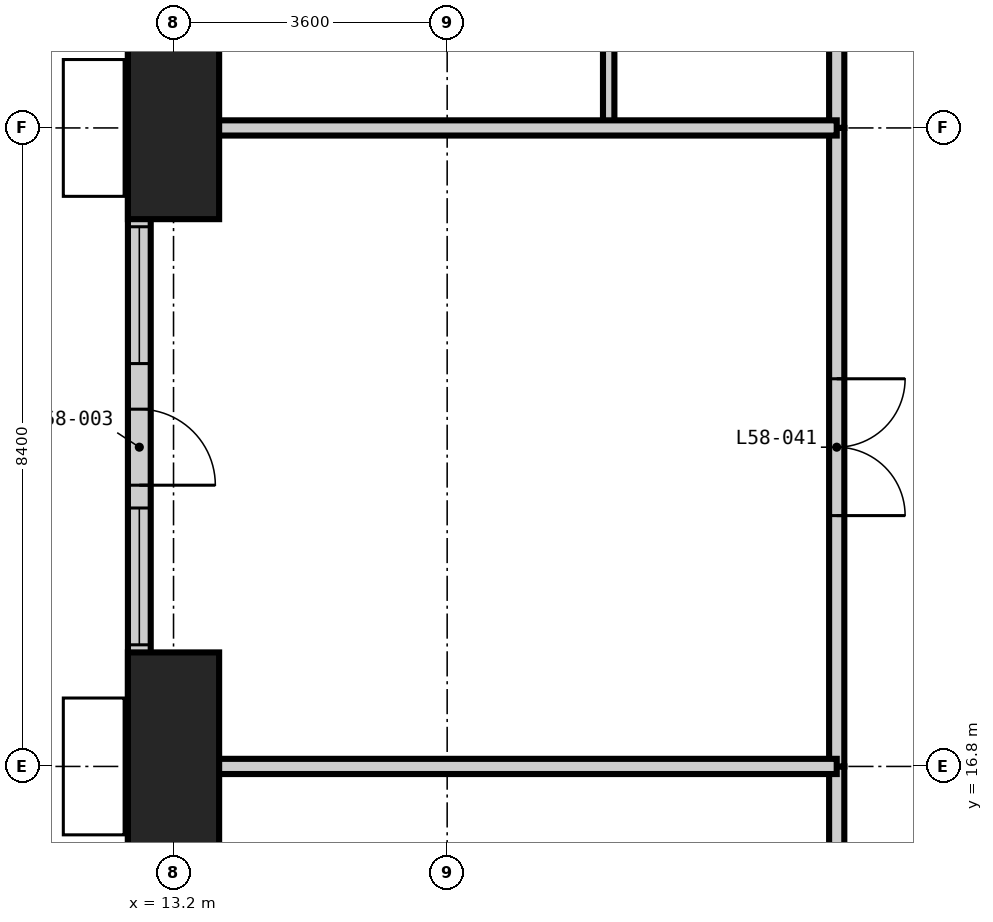
"""IFC4 building model, lengths in metres.
Left out: names, types, materials, properties, quantities, classifications, styles, units other than length and angle.
Written with IfcOpenShell. Run it as: python <this file> out.ifc"""

import sys

from ifc_helpers import new_model, si_unit, direction, frame, frame_2d, origin, origin_2d, place, context, subcontext, project, spatial, rectangle, extrude, element, fill, save


model = new_model("IFC4")
c1 = context("Model", 3, precision=1e-05, world=origin(), true_north=direction((0.0, 1.0)))
c2 = subcontext(c1, "Body", "Model", "MODEL_VIEW")
j1 = project(units=[si_unit("LENGTHUNIT", "METRE"), si_unit("PLANEANGLEUNIT", "RADIAN")], contexts=[c1])
p1 = place(None, origin())
s1 = spatial("IfcSite", under=j1, at=p1, CompositionType="ELEMENT")
p2 = place(p1, origin())
s2 = spatial("IfcBuilding", under=s1, at=p2, CompositionType="ELEMENT")
p3 = place(p2, frame((0.0, 0.0, 225.6)))
s3 = spatial("IfcBuildingStorey", under=s2, at=p3, CompositionType="ELEMENT", Elevation=225.6)
p4 = place(p3, frame((13.2, 16.8, -0.35), z_axis=(0.0, 0.0, 1.0), x_axis=(1.0, 0.0, 0.0)))
e1 = element("IfcColumn", 1, at=p4, inside=s3, PredefinedType="COLUMN", context=c2, shape_type="SweptSolid", body=[
    extrude(rectangle(XDim=1.2, YDim=3.0, at=origin_2d()), origin(), (0.0, 0.0, 1.0), 3.9),
])
p5 = place(p3, frame((13.2, 25.2, -0.35), z_axis=(0.0, 0.0, 1.0), x_axis=(1.0, 0.0, 0.0)))
e2 = element("IfcColumn", 2, at=p5, inside=s3, PredefinedType="COLUMN", context=c2, shape_type="SweptSolid", body=[
    extrude(rectangle(XDim=1.2, YDim=2.4, at=origin_2d()), origin(), (0.0, 0.0, 1.0), 3.9),
])
p6 = place(p3, frame((12.75, 51.9, 0.0), z_axis=(0.0, 0.0, 1.0), x_axis=(0.0, -1.0, 0.0)))
e3 = element("IfcWall", 3, at=p6, inside=s3, PredefinedType="SOLIDWALL", context=c2, shape_type="SweptSolid", body=[
    extrude(rectangle(XDim=45.0, YDim=0.3, at=frame_2d((22.5, 0.0))), origin(), (0.0, 0.0, 1.0), 3.1),
])
p7 = place(p6, frame((41.25, 0.0, 0.0)))
e4 = element("IfcOpeningElement", 4, at=p7, cuts=e3, PredefinedType="OPENING", context=c2, shape_type="SweptSolid", body=[
    extrude(rectangle(XDim=1.0, YDim=2.4, at=frame_2d((0.5, 1.2))), frame((0.0, 0.16, 0.0), z_axis=(0.0, -1.0, 0.0), x_axis=(1.0, 0.0, 0.0)), (0.0, 0.0, 1.0), 0.32),
])
p8 = place(p6, frame((36.7, 0.0, 0.0)))
e5 = element("IfcOpeningElement", 5, at=p8, cuts=e3, PredefinedType="OPENING", context=c2, shape_type="SweptSolid", body=[
    extrude(rectangle(XDim=1.0, YDim=2.4, at=frame_2d((0.5, 1.2))), frame((0.0, 0.16, 0.0), z_axis=(0.0, -1.0, 0.0), x_axis=(1.0, 0.0, 0.0)), (0.0, 0.0, 1.0), 0.32),
])
p9 = place(p6, frame((30.4, 0.0, 0.0)))
e6 = element("IfcOpeningElement", 6, at=p9, cuts=e3, PredefinedType="OPENING", context=c2, shape_type="SweptSolid", body=[
    extrude(rectangle(XDim=1.0, YDim=2.4, at=frame_2d((0.5, 1.2))), frame((0.0, 0.16, 0.0), z_axis=(0.0, -1.0, 0.0), x_axis=(1.0, 0.0, 0.0)), (0.0, 0.0, 1.0), 0.32),
])
p10 = place(p6, frame((31.7, 0.0, 0.6)))
e7 = element("IfcOpeningElement", 7, at=p10, cuts=e3, PredefinedType="OPENING", context=c2, shape_type="SweptSolid", body=[
    extrude(rectangle(XDim=1.8, YDim=2.1, at=frame_2d((0.9, 1.05))), frame((0.0, 0.16, 0.0), z_axis=(0.0, -1.0, 0.0), x_axis=(1.0, 0.0, 0.0)), (0.0, 0.0, 1.0), 0.32),
])
p11 = place(p6, frame((28.0, 0.0, 0.6)))
e8 = element("IfcOpeningElement", 8, at=p11, cuts=e3, PredefinedType="OPENING", context=c2, shape_type="SweptSolid", body=[
    extrude(rectangle(XDim=1.8, YDim=2.1, at=frame_2d((0.9, 1.05))), frame((0.0, 0.16, 0.0), z_axis=(0.0, -1.0, 0.0), x_axis=(1.0, 0.0, 0.0)), (0.0, 0.0, 1.0), 0.32),
])
p12 = place(p6, frame((24.1, 0.0, 0.0)))
e9 = element("IfcOpeningElement", 9, at=p12, cuts=e3, PredefinedType="OPENING", context=c2, shape_type="SweptSolid", body=[
    extrude(rectangle(XDim=1.0, YDim=2.4, at=frame_2d((0.5, 1.2))), frame((0.0, 0.16, 0.0), z_axis=(0.0, -1.0, 0.0), x_axis=(1.0, 0.0, 0.0)), (0.0, 0.0, 1.0), 0.32),
])
p13 = place(p6, frame((19.9, 0.0, 0.0)))
e10 = element("IfcOpeningElement", 10, at=p13, cuts=e3, PredefinedType="OPENING", context=c2, shape_type="SweptSolid", body=[
    extrude(rectangle(XDim=1.0, YDim=2.4, at=frame_2d((0.5, 1.2))), frame((0.0, 0.16, 0.0), z_axis=(0.0, -1.0, 0.0), x_axis=(1.0, 0.0, 0.0)), (0.0, 0.0, 1.0), 0.32),
])
p14 = place(p6, frame((15.7, 0.0, 0.0)))
e11 = element("IfcOpeningElement", 11, at=p14, cuts=e3, PredefinedType="OPENING", context=c2, shape_type="SweptSolid", body=[
    extrude(rectangle(XDim=1.0, YDim=2.4, at=frame_2d((0.5, 1.2))), frame((0.0, 0.16, 0.0), z_axis=(0.0, -1.0, 0.0), x_axis=(1.0, 0.0, 0.0)), (0.0, 0.0, 1.0), 0.32),
])
p15 = place(p6, frame((11.5, 0.0, 0.0)))
e12 = element("IfcOpeningElement", 12, at=p15, cuts=e3, PredefinedType="OPENING", context=c2, shape_type="SweptSolid", body=[
    extrude(rectangle(XDim=1.0, YDim=2.4, at=frame_2d((0.5, 1.2))), frame((0.0, 0.16, 0.0), z_axis=(0.0, -1.0, 0.0), x_axis=(1.0, 0.0, 0.0)), (0.0, 0.0, 1.0), 0.32),
])
p16 = place(p6, frame((7.3, 0.0, 0.0)))
e13 = element("IfcOpeningElement", 13, at=p16, cuts=e3, PredefinedType="OPENING", context=c2, shape_type="SweptSolid", body=[
    extrude(rectangle(XDim=1.0, YDim=2.4, at=frame_2d((0.5, 1.2))), frame((0.0, 0.16, 0.0), z_axis=(0.0, -1.0, 0.0), x_axis=(1.0, 0.0, 0.0)), (0.0, 0.0, 1.0), 0.32),
])
p17 = place(p6, frame((2.75, 0.0, 0.0)))
e14 = element("IfcOpeningElement", 14, at=p17, cuts=e3, PredefinedType="OPENING", context=c2, shape_type="SweptSolid", body=[
    extrude(rectangle(XDim=1.0, YDim=2.4, at=frame_2d((0.5, 1.2))), frame((0.0, 0.16, 0.0), z_axis=(0.0, -1.0, 0.0), x_axis=(1.0, 0.0, 0.0)), (0.0, 0.0, 1.0), 0.32),
])
p18 = place(p3, frame((18.925, 25.2, 0.0), z_axis=(0.0, 0.0, 1.0), x_axis=(0.0, 1.0, 0.0)))
e15 = element("IfcWall", 15, at=p18, inside=s3, PredefinedType="PARTITIONING", context=c2, shape_type="SweptSolid", body=[
    extrude(rectangle(XDim=2.4, YDim=0.15, at=frame_2d((1.2, 0.0))), origin(), (0.0, 0.0, 1.0), 3.55),
])
p19 = place(p3, frame((21.925, 13.75, 0.0), z_axis=(0.0, 0.0, 1.0), x_axis=(0.0, 1.0, 0.0)))
e16 = element("IfcWall", 16, at=p19, inside=s3, PredefinedType="PARTITIONING", context=c2, shape_type="SweptSolid", body=[
    extrude(rectangle(XDim=3.05, YDim=0.2, at=frame_2d((1.525, 0.0))), origin(), (0.0, 0.0, 1.0), 3.55),
])
p20 = place(p19, frame((1.025, 0.0, 0.0)))
e17 = element("IfcOpeningElement", 17, at=p20, cuts=e16, PredefinedType="OPENING", context=c2, shape_type="SweptSolid", body=[
    extrude(rectangle(XDim=1.0, YDim=2.2, at=frame_2d((0.5, 1.1))), frame((0.0, 0.11, 0.0), z_axis=(0.0, -1.0, 0.0), x_axis=(1.0, 0.0, 0.0)), (0.0, 0.0, 1.0), 0.22),
])
p21 = place(p3, frame((21.925, 25.2, 0.0), z_axis=(0.0, 0.0, 1.0), x_axis=(0.0, 1.0, 0.0)))
e18 = element("IfcWall", 18, at=p21, inside=s3, PredefinedType="PARTITIONING", context=c2, shape_type="SweptSolid", body=[
    extrude(rectangle(XDim=19.25, YDim=0.2, at=frame_2d((9.625, 0.0))), origin(), (0.0, 0.0, 1.0), 3.55),
])
p22 = place(p21, frame((4.9, 0.0, 0.0)))
e19 = element("IfcOpeningElement", 19, at=p22, cuts=e18, PredefinedType="OPENING", context=c2, shape_type="SweptSolid", body=[
    extrude(rectangle(XDim=1.0, YDim=2.2, at=frame_2d((0.5, 1.1))), frame((0.0, 0.11, 0.0), z_axis=(0.0, -1.0, 0.0), x_axis=(1.0, 0.0, 0.0)), (0.0, 0.0, 1.0), 0.22),
])
p23 = place(p21, frame((10.9, 0.0, 0.0)))
e20 = element("IfcOpeningElement", 20, at=p23, cuts=e18, PredefinedType="OPENING", context=c2, shape_type="SweptSolid", body=[
    extrude(rectangle(XDim=1.0, YDim=2.2, at=frame_2d((0.5, 1.1))), frame((0.0, 0.11, 0.0), z_axis=(0.0, -1.0, 0.0), x_axis=(1.0, 0.0, 0.0)), (0.0, 0.0, 1.0), 0.22),
])
p24 = place(p21, frame((17.525, 0.0, 0.0)))
e21 = element("IfcOpeningElement", 21, at=p24, cuts=e18, PredefinedType="OPENING", context=c2, shape_type="SweptSolid", body=[
    extrude(rectangle(XDim=1.0, YDim=2.2, at=frame_2d((0.5, 1.1))), frame((0.0, 0.11, 0.0), z_axis=(0.0, -1.0, 0.0), x_axis=(1.0, 0.0, 0.0)), (0.0, 0.0, 1.0), 0.22),
])
p25 = place(p3, frame((21.925, 25.2, 0.0), z_axis=(0.0, 0.0, 1.0), x_axis=(0.0, -1.0, 0.0)))
e22 = element("IfcWall", 22, at=p25, inside=s3, PredefinedType="PARTITIONING", context=c2, shape_type="SweptSolid", body=[
    extrude(rectangle(XDim=8.4, YDim=0.2, at=frame_2d((4.2, 0.0))), origin(), (0.0, 0.0, 1.0), 3.55),
])
p26 = place(p25, frame((3.3, 0.0, 0.0)))
e23 = element("IfcOpeningElement", 23, at=p26, cuts=e22, PredefinedType="OPENING", context=c2, shape_type="SweptSolid", body=[
    extrude(rectangle(XDim=1.8, YDim=2.4, at=frame_2d((0.9, 1.2))), frame((0.0, 0.11, 0.0), z_axis=(0.0, -1.0, 0.0), x_axis=(1.0, 0.0, 0.0)), (0.0, 0.0, 1.0), 0.22),
])
for number, where, z_axis, x_axis in (
    (24, (12.6, 16.8, 0.0), (0.0, 0.0, 1.0), (1.0, 0.0, 0.0)),
    (25, (12.6, 25.2, 0.0), (0.0, 0.0, 1.0), (1.0, 0.0, 0.0)),
):
    element("IfcWall", number, at=place(p3, frame(where, z_axis=z_axis, x_axis=x_axis)), inside=s3, PredefinedType="PARTITIONING", context=c2, shape_type="SweptSolid", body=[
        extrude(rectangle(XDim=9.325, YDim=0.2, at=frame_2d((4.663, 0.0))), origin(), (0.0, 0.0, 1.0), 3.55),
    ])
p27 = place(p9, origin())
e26 = element("IfcDoor", 26, at=p27, inside=s3, OperationType="SINGLE_SWING_RIGHT", PredefinedType="DOOR", context=c2, shape_type="SweptSolid", body=[
    extrude(rectangle(XDim=1.0, YDim=2.4, at=frame_2d((0.5, 1.2))), frame((0.0, 0.025, 0.0), z_axis=(0.0, -1.0, 0.0), x_axis=(1.0, 0.0, 0.0)), (0.0, 0.0, 1.0), 0.05),
])
fill(e6, e26)
p28 = place(p10, origin())
e27 = element("IfcWindow", 27, at=p28, inside=s3, PartitioningType="SINGLE_PANEL", PredefinedType="WINDOW", context=c2, shape_type="SweptSolid", body=[
    extrude(rectangle(XDim=1.8, YDim=2.1, at=frame_2d((0.9, 1.05))), frame((0.0, 0.03, 0.0), z_axis=(0.0, -1.0, 0.0), x_axis=(1.0, 0.0, 0.0)), (0.0, 0.0, 1.0), 0.06),
])
fill(e7, e27)
p29 = place(p11, origin())
e28 = element("IfcWindow", 28, at=p29, inside=s3, PartitioningType="SINGLE_PANEL", PredefinedType="WINDOW", context=c2, shape_type="SweptSolid", body=[
    extrude(rectangle(XDim=1.8, YDim=2.1, at=frame_2d((0.9, 1.05))), frame((0.0, 0.03, 0.0), z_axis=(0.0, -1.0, 0.0), x_axis=(1.0, 0.0, 0.0)), (0.0, 0.0, 1.0), 0.06),
])
fill(e8, e28)
p30 = place(p26, origin())
e29 = element("IfcDoor", 29, at=p30, inside=s3, OperationType="DOUBLE_DOOR_DOUBLE_SWING", PredefinedType="DOOR", context=c2, shape_type="SweptSolid", body=[
    extrude(rectangle(XDim=1.8, YDim=2.4, at=frame_2d((0.9, 1.2))), frame((0.0, 0.025, 0.0), z_axis=(0.0, -1.0, 0.0), x_axis=(1.0, 0.0, 0.0)), (0.0, 0.0, 1.0), 0.05),
])
fill(e23, e29)
save(model, sys.argv[1])
